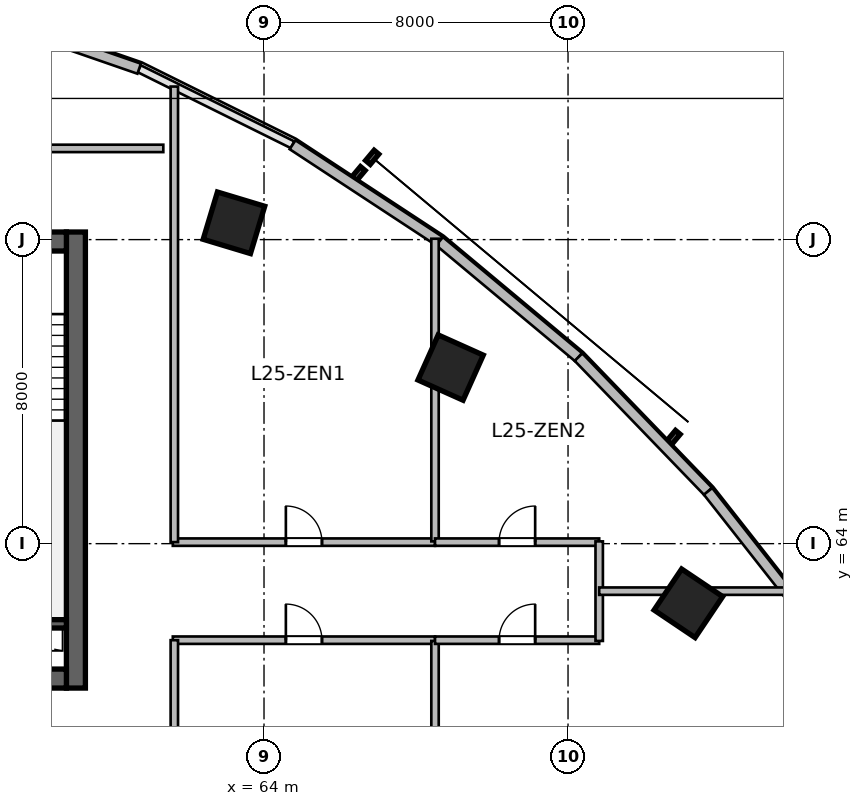
"""IFC4 building model, lengths in metres.
Left out: names, types, materials, properties, quantities, classifications, styles, units other than length and angle.
Written with IfcOpenShell. Run it as: python <this file> out.ifc"""

import sys

from ifc_helpers import new_model, si_unit, direction, frame, frame_2d, origin, origin_2d, place, context, subcontext, project, spatial, rectangle, extrude, source, transform, mapped, element, fill, save


model = new_model("IFC4")
c1 = context("Model", 3, precision=1e-05, world=origin(), true_north=direction((0.0, 1.0)))
c2 = subcontext(c1, "Body", "Model", "MODEL_VIEW")
j1 = project(units=[si_unit("LENGTHUNIT", "METRE"), si_unit("PLANEANGLEUNIT", "RADIAN")], contexts=[c1])
p1 = place(None, origin())
s1 = spatial("IfcSite", under=j1, at=p1, CompositionType="ELEMENT")
p2 = place(p1, origin())
s2 = spatial("IfcBuilding", under=s1, at=p2, CompositionType="ELEMENT")
p3 = place(p2, frame((0.0, 0.0, 107.7)))
s3 = spatial("IfcBuildingStorey", under=s2, at=p3, CompositionType="ELEMENT", Elevation=107.7)
m1 = source(origin(), c2, "Body", "SweptSolid", [
    extrude(rectangle(XDim=12.0, YDim=0.5, at=frame_2d((6.0, 0.0))), origin(), (0.0, 0.0, 1.0), 3.9),
])
p4 = place(p3, frame((59.05, 60.2, 0.0), z_axis=(0.0, 0.0, 1.0), x_axis=(0.0, 1.0, 0.0)))
e1 = element("IfcWall", 1, at=p4, inside=s3, PredefinedType="SHEAR", context=c2, shape_type="MappedRepresentation", body=[
    mapped(m1, transform((0.0, 0.0, 0.0), scale=1.0)),
])
m2 = source(origin(), c2, "Body", "SweptSolid", [
    extrude(rectangle(XDim=21.6, YDim=0.5, at=frame_2d((10.8, 0.0))), origin(), (0.0, 0.0, 1.0), 3.9),
])
p5 = place(p3, frame((37.2, 60.45, 0.0), z_axis=(0.0, 0.0, 1.0), x_axis=(1.0, 0.0, 0.0)))
e2 = element("IfcWall", 2, at=p5, inside=s3, PredefinedType="SHEAR", context=c2, shape_type="MappedRepresentation", body=[
    mapped(m2, transform((0.0, 0.0, 0.0), scale=1.0)),
])
p6 = place(p5, frame((1.1, 0.0, 0.0)))
e3 = element("IfcOpeningElement", 3, at=p6, cuts=e2, PredefinedType="OPENING", context=c2, shape_type="SweptSolid", body=[
    extrude(rectangle(XDim=1.15, YDim=2.15, at=frame_2d((0.575, 1.075))), frame((0.0, 0.26, 0.0), z_axis=(0.0, -1.0, 0.0), x_axis=(1.0, 0.0, 0.0)), (0.0, 0.0, 1.0), 0.52),
])
p7 = place(p5, frame((19.5, 0.0, 0.0)))
e4 = element("IfcOpeningElement", 4, at=p7, cuts=e2, PredefinedType="OPENING", context=c2, shape_type="SweptSolid", body=[
    extrude(rectangle(XDim=0.9, YDim=2.1, at=frame_2d((0.45, 1.05))), frame((0.0, 0.26, 0.0), z_axis=(0.0, -1.0, 0.0), x_axis=(1.0, 0.0, 0.0)), (0.0, 0.0, 1.0), 0.52),
])
p8 = place(p5, frame((12.02, 0.0, 0.0)))
e5 = element("IfcOpeningElement", 5, at=p8, cuts=e2, PredefinedType="OPENING", context=c2, shape_type="SweptSolid", body=[
    extrude(rectangle(XDim=1.6, YDim=2.15, at=frame_2d((0.8, 1.075))), frame((0.0, 0.26, 0.0), z_axis=(0.0, -1.0, 0.0), x_axis=(1.0, 0.0, 0.0)), (0.0, 0.0, 1.0), 0.52),
])
p9 = place(p3, frame((37.2, 71.95, 0.0), z_axis=(0.0, 0.0, 1.0), x_axis=(1.0, 0.0, 0.0)))
e6 = element("IfcWall", 6, at=p9, inside=s3, PredefinedType="SHEAR", context=c2, shape_type="MappedRepresentation", body=[
    mapped(m2, transform((0.0, 0.0, 0.0), scale=1.0)),
])
p10 = place(p9, frame((1.2, 0.0, 0.0)))
e7 = element("IfcOpeningElement", 7, at=p10, cuts=e6, PredefinedType="OPENING", context=c2, shape_type="SweptSolid", body=[
    extrude(rectangle(XDim=0.9, YDim=2.1, at=frame_2d((0.45, 1.05))), frame((0.0, 0.26, 0.0), z_axis=(0.0, -1.0, 0.0), x_axis=(1.0, 0.0, 0.0)), (0.0, 0.0, 1.0), 0.52),
])
p11 = place(p9, frame((14.7, 0.0, 0.0)))
e8 = element("IfcOpeningElement", 8, at=p11, cuts=e6, PredefinedType="OPENING", context=c2, shape_type="SweptSolid", body=[
    extrude(rectangle(XDim=1.2, YDim=2.15, at=frame_2d((0.6, 1.075))), frame((0.0, 0.26, 0.0), z_axis=(0.0, -1.0, 0.0), x_axis=(1.0, 0.0, 0.0)), (0.0, 0.0, 1.0), 0.52),
])
p12 = place(p9, frame((4.15, 0.0, 0.0)))
e9 = element("IfcOpeningElement", 9, at=p12, cuts=e6, PredefinedType="OPENING", context=c2, shape_type="SweptSolid", body=[
    extrude(rectangle(XDim=1.3, YDim=2.15, at=frame_2d((0.65, 1.075))), frame((0.0, 0.26, 0.0), z_axis=(0.0, -1.0, 0.0), x_axis=(1.0, 0.0, 0.0)), (0.0, 0.0, 1.0), 0.52),
])
p13 = place(p9, frame((7.25, 0.0, 0.0)))
e10 = element("IfcOpeningElement", 10, at=p13, cuts=e6, PredefinedType="OPENING", context=c2, shape_type="SweptSolid", body=[
    extrude(rectangle(XDim=0.9, YDim=2.1, at=frame_2d((0.45, 1.05))), frame((0.0, 0.26, 0.0), z_axis=(0.0, -1.0, 0.0), x_axis=(1.0, 0.0, 0.0)), (0.0, 0.0, 1.0), 0.52),
])
p14 = place(p9, frame((10.95, 0.0, 0.0)))
e11 = element("IfcOpeningElement", 11, at=p14, cuts=e6, PredefinedType="OPENING", context=c2, shape_type="SweptSolid", body=[
    extrude(rectangle(XDim=0.9, YDim=2.1, at=frame_2d((0.45, 1.05))), frame((0.0, 0.26, 0.0), z_axis=(0.0, -1.0, 0.0), x_axis=(1.0, 0.0, 0.0)), (0.0, 0.0, 1.0), 0.52),
])
m3 = source(origin(), c2, "Body", "SweptSolid", [
    extrude(rectangle(XDim=3.27, YDim=0.22, at=frame_2d((1.635, 0.0))), origin(), (0.0, 0.0, 1.0), 3.9),
])
p15 = place(p3, frame((55.53, 61.89, 0.0), z_axis=(0.0, 0.0, 1.0), x_axis=(1.0, 0.0, 0.0)))
e12 = element("IfcWall", 12, at=p15, inside=s3, PredefinedType="SHEAR", context=c2, shape_type="MappedRepresentation", body=[
    mapped(m3, transform((0.0, 0.0, 0.0), scale=1.0)),
])
m4 = source(origin(), c2, "Body", "SweptSolid", [
    extrude(rectangle(XDim=1.3, YDim=1.3, at=origin_2d()), origin(), (0.0, 0.0, 1.0), 3.9),
])
for number, where, z_axis, x_axis in (
    (13, (63.209, 72.442, 0.0), (0.0, 0.0, 1.0), (0.289, 0.957, 0.0)),
    (14, (68.91, 68.633, 0.0), (0.0, 0.0, 1.0), (0.409, 0.912, 0.0)),
    (15, (75.167, 62.43, 0.0), (0.0, 0.0, 1.0), (0.558, 0.83, 0.0)),
):
    element("IfcColumn", number, at=place(p3, frame(where, z_axis=z_axis, x_axis=x_axis)), inside=s3, PredefinedType="COLUMN", context=c2, shape_type="MappedRepresentation", body=[
        mapped(m4, transform((0.0, 0.0, 0.0), scale=1.0)),
    ])
m5 = source(origin(), c2, "Body", "SweptSolid", [
    extrude(rectangle(XDim=4.409, YDim=0.28, at=frame_2d((2.205, 0.0))), origin(), (0.0, 0.0, 1.0), 3.65),
])
p16 = place(p3, frame((56.548, 77.941, 0.0), z_axis=(0.0, 0.0, 1.0), x_axis=(0.944879374121, -0.327418643881, 0.0)))
e16 = element("IfcWall", 16, at=p16, inside=s3, PredefinedType="SOLIDWALL", context=c2, shape_type="MappedRepresentation", body=[
    mapped(m5, transform((0.0, 0.0, 0.0), scale=1.0)),
])
m6 = source(origin(), c2, "Body", "SweptSolid", [
    extrude(rectangle(XDim=4.626, YDim=0.28, at=frame_2d((2.313, 0.0))), origin(), (0.0, 0.0, 1.0), 3.65),
])
p17 = place(p3, frame((64.751, 74.496, 0.0), z_axis=(0.0, 0.0, 1.0), x_axis=(0.83595938331, -0.548791316855, 0.0)))
e17 = element("IfcWall", 17, at=p17, inside=s3, PredefinedType="SOLIDWALL", context=c2, shape_type="MappedRepresentation", body=[
    mapped(m6, transform((0.0, 0.0, 0.0), scale=1.0)),
])
m7 = source(origin(), c2, "Body", "SweptSolid", [
    extrude(rectangle(XDim=4.762, YDim=0.28, at=frame_2d((2.381, 0.0))), origin(), (0.0, 0.0, 1.0), 3.65),
])
p18 = place(p3, frame((68.618, 71.958, 0.0), z_axis=(0.0, 0.0, 1.0), x_axis=(0.767952279762, -0.640507061638, 0.0)))
e18 = element("IfcWall", 18, at=p18, inside=s3, PredefinedType="SOLIDWALL", context=c2, shape_type="MappedRepresentation", body=[
    mapped(m7, transform((0.0, 0.0, 0.0), scale=1.0)),
])
m8 = source(origin(), c2, "Body", "SweptSolid", [
    extrude(rectangle(XDim=4.908, YDim=0.28, at=frame_2d((2.454, 0.0))), origin(), (0.0, 0.0, 1.0), 3.65),
])
p19 = place(p3, frame((72.275, 68.907, 0.0), z_axis=(0.0, 0.0, 1.0), x_axis=(0.694613154328, -0.719383462302, 0.0)))
e19 = element("IfcWall", 19, at=p19, inside=s3, PredefinedType="SOLIDWALL", context=c2, shape_type="MappedRepresentation", body=[
    mapped(m8, transform((0.0, 0.0, 0.0), scale=1.0)),
])
m9 = source(origin(), c2, "Body", "SweptSolid", [
    extrude(rectangle(XDim=5.058, YDim=0.28, at=frame_2d((2.529, 0.0))), origin(), (0.0, 0.0, 1.0), 3.65),
])
p20 = place(p3, frame((75.685, 65.376, 0.0), z_axis=(0.0, 0.0, 1.0), x_axis=(0.618145507434, -0.786063694391, 0.0)))
e20 = element("IfcWall", 20, at=p20, inside=s3, PredefinedType="SOLIDWALL", context=c2, shape_type="MappedRepresentation", body=[
    mapped(m9, transform((0.0, 0.0, 0.0), scale=1.0)),
])
m10 = source(origin(), c2, "Body", "SweptSolid", [
    extrude(rectangle(XDim=13.2, YDim=0.195, at=frame_2d((6.6, 0.0))), origin(), (0.0, 0.0, 1.0), 3.022),
])
p21 = place(p3, frame((48.15, 74.4, 0.0), z_axis=(0.0, 0.0, 1.0), x_axis=(1.0, 0.0, 0.0)))
e21 = element("IfcWall", 21, at=p21, inside=s3, PredefinedType="PARTITIONING", context=c2, shape_type="MappedRepresentation", body=[
    mapped(m10, transform((0.0, 0.0, 0.0), scale=1.0)),
])
p22 = place(p21, frame((5.6, 0.0, 0.0)))
e22 = element("IfcOpeningElement", 22, at=p22, cuts=e21, PredefinedType="OPENING", context=c2, shape_type="SweptSolid", body=[
    extrude(rectangle(XDim=1.1, YDim=2.15, at=frame_2d((0.55, 1.075))), frame((0.0, 0.107, 0.0), z_axis=(0.0, -1.0, 0.0), x_axis=(1.0, 0.0, 0.0)), (0.0, 0.0, 1.0), 0.215),
])
m11 = source(origin(), c2, "Body", "SweptSolid", [
    extrude(rectangle(XDim=6.9, YDim=0.195, at=frame_2d((3.45, 0.0))), origin(), (0.0, 0.0, 1.0), 3.65),
])
p23 = place(p3, frame((61.6, 64.04, 0.0), z_axis=(0.0, 0.0, 1.0), x_axis=(1.0, 0.0, 0.0)))
e23 = element("IfcWall", 23, at=p23, inside=s3, PredefinedType="PARTITIONING", context=c2, shape_type="MappedRepresentation", body=[
    mapped(m11, transform((0.0, 0.0, 0.0), scale=1.0)),
])
p24 = place(p23, frame((2.975, 0.0, 0.0)))
e24 = element("IfcOpeningElement", 24, at=p24, cuts=e23, PredefinedType="OPENING", context=c2, shape_type="SweptSolid", body=[
    extrude(rectangle(XDim=0.95, YDim=2.1, at=frame_2d((0.475, 1.05))), frame((0.0, 0.107, 0.0), z_axis=(0.0, -1.0, 0.0), x_axis=(1.0, 0.0, 0.0)), (0.0, 0.0, 1.0), 0.215),
])
m12 = source(origin(), c2, "Body", "SweptSolid", [
    extrude(rectangle(XDim=7.963, YDim=0.195, at=frame_2d((3.982, 0.0))), origin(), (0.0, 0.0, 1.0), 2.942),
])
p25 = place(p3, frame((68.5, 64.06, 0.0), z_axis=(0.0, 0.0, 1.0), x_axis=(0.0, 1.0, 0.0)))
e25 = element("IfcWall", 25, at=p25, inside=s3, PredefinedType="PARTITIONING", context=c2, shape_type="MappedRepresentation", body=[
    mapped(m12, transform((0.0, 0.0, 0.0), scale=1.0)),
])
m13 = source(origin(), c2, "Body", "SweptSolid", [
    extrude(rectangle(XDim=4.32, YDim=0.195, at=frame_2d((2.16, 0.0))), origin(), (0.0, 0.0, 1.0), 3.65),
])
p26 = place(p3, frame((68.5, 64.04, 0.0), z_axis=(0.0, 0.0, 1.0), x_axis=(1.0, 0.0, 0.0)))
e26 = element("IfcWall", 26, at=p26, inside=s3, PredefinedType="PARTITIONING", context=c2, shape_type="MappedRepresentation", body=[
    mapped(m13, transform((0.0, 0.0, 0.0), scale=1.0)),
])
p27 = place(p26, frame((1.685, 0.0, 0.0)))
e27 = element("IfcOpeningElement", 27, at=p27, cuts=e26, PredefinedType="OPENING", context=c2, shape_type="SweptSolid", body=[
    extrude(rectangle(XDim=0.95, YDim=2.1, at=frame_2d((0.475, 1.05))), frame((0.0, 0.107, 0.0), z_axis=(0.0, -1.0, 0.0), x_axis=(1.0, 0.0, 0.0)), (0.0, 0.0, 1.0), 0.215),
])
p28 = place(p3, frame((61.6, 61.46, 0.0), z_axis=(0.0, 0.0, 1.0), x_axis=(1.0, 0.0, 0.0)))
e28 = element("IfcWall", 28, at=p28, inside=s3, PredefinedType="PARTITIONING", context=c2, shape_type="MappedRepresentation", body=[
    mapped(m11, transform((0.0, 0.0, 0.0), scale=1.0)),
])
p29 = place(p28, frame((2.975, 0.0, 0.0)))
e29 = element("IfcOpeningElement", 29, at=p29, cuts=e28, PredefinedType="OPENING", context=c2, shape_type="SweptSolid", body=[
    extrude(rectangle(XDim=0.95, YDim=2.1, at=frame_2d((0.475, 1.05))), frame((0.0, 0.107, 0.0), z_axis=(0.0, -1.0, 0.0), x_axis=(1.0, 0.0, 0.0)), (0.0, 0.0, 1.0), 0.215),
])
m14 = source(origin(), c2, "Body", "SweptSolid", [
    extrude(rectangle(XDim=23.346, YDim=0.195, at=frame_2d((11.673, 0.0))), origin(), (0.0, 0.0, 1.0), 2.942),
])
p30 = place(p3, frame((68.5, 38.094, 0.0), z_axis=(0.0, 0.0, 1.0), x_axis=(0.0, 1.0, 0.0)))
e30 = element("IfcWall", 30, at=p30, inside=s3, PredefinedType="PARTITIONING", context=c2, shape_type="MappedRepresentation", body=[
    mapped(m14, transform((0.0, 0.0, 0.0), scale=1.0)),
])
p31 = place(p3, frame((68.5, 61.46, 0.0), z_axis=(0.0, 0.0, 1.0), x_axis=(1.0, 0.0, 0.0)))
e31 = element("IfcWall", 31, at=p31, inside=s3, PredefinedType="PARTITIONING", context=c2, shape_type="MappedRepresentation", body=[
    mapped(m13, transform((0.0, 0.0, 0.0), scale=1.0)),
])
p32 = place(p31, frame((1.685, 0.0, 0.0)))
e32 = element("IfcOpeningElement", 32, at=p32, cuts=e31, PredefinedType="OPENING", context=c2, shape_type="SweptSolid", body=[
    extrude(rectangle(XDim=0.95, YDim=2.1, at=frame_2d((0.475, 1.05))), frame((0.0, 0.107, 0.0), z_axis=(0.0, -1.0, 0.0), x_axis=(1.0, 0.0, 0.0)), (0.0, 0.0, 1.0), 0.215),
])
m15 = source(origin(), c2, "Body", "SweptSolid", [
    extrude(rectangle(XDim=13.988, YDim=0.195, at=frame_2d((6.994, 0.0))), origin(), (0.0, 0.0, 1.0), 2.942),
])
p33 = place(p3, frame((61.64, 47.472, 0.0), z_axis=(0.0, 0.0, 1.0), x_axis=(0.0, 1.0, 0.0)))
e33 = element("IfcWall", 33, at=p33, inside=s3, PredefinedType="PARTITIONING", context=c2, shape_type="MappedRepresentation", body=[
    mapped(m15, transform((0.0, 0.0, 0.0), scale=1.0)),
])
m16 = source(origin(), c2, "Body", "SweptSolid", [
    extrude(rectangle(XDim=11.987, YDim=0.195, at=frame_2d((5.994, 0.0))), origin(), (0.0, 0.0, 1.0), 3.65),
])
p34 = place(p3, frame((61.64, 64.04, 0.0), z_axis=(0.0, 0.0, 1.0), x_axis=(0.0, 1.0, 0.0)))
e34 = element("IfcWall", 34, at=p34, inside=s3, PredefinedType="PARTITIONING", context=c2, shape_type="MappedRepresentation", body=[
    mapped(m16, transform((0.0, 0.0, 0.0), scale=1.0)),
])
m17 = source(origin(), c2, "Body", "SweptSolid", [
    extrude(rectangle(XDim=2.62, YDim=0.195, at=frame_2d((1.31, 0.0))), origin(), (0.0, 0.0, 1.0), 3.324),
])
p35 = place(p3, frame((72.82, 61.44, 0.0), z_axis=(0.0, 0.0, 1.0), x_axis=(0.0, 1.0, 0.0)))
e35 = element("IfcWall", 35, at=p35, inside=s3, PredefinedType="PARTITIONING", context=c2, shape_type="MappedRepresentation", body=[
    mapped(m17, transform((0.0, 0.0, 0.0), scale=1.0)),
])
m18 = source(origin(), c2, "Body", "SweptSolid", [
    extrude(rectangle(XDim=4.917, YDim=0.195, at=frame_2d((2.459, 0.0))), origin(), (0.0, 0.0, 1.0), 3.65),
])
p36 = place(p3, frame((72.82, 62.75, 0.0), z_axis=(0.0, 0.0, 1.0), x_axis=(1.0, 0.0, 0.0)))
e36 = element("IfcWall", 36, at=p36, inside=s3, PredefinedType="PARTITIONING", context=c2, shape_type="MappedRepresentation", body=[
    mapped(m18, transform((0.0, 0.0, 0.0), scale=1.0)),
])
m19 = source(origin(), c2, "Body", "SweptSolid", [
    extrude(rectangle(XDim=0.95, YDim=2.1, at=frame_2d((0.475, 1.05))), frame((0.0, 0.025, 0.0), z_axis=(0.0, -1.0, 0.0), x_axis=(1.0, 0.0, 0.0)), (0.0, 0.0, 1.0), 0.05),
])
p37 = place(p24, origin())
e37 = element("IfcDoor", 37, at=p37, inside=s3, OperationType="SINGLE_SWING_LEFT", PredefinedType="DOOR", context=c2, shape_type="MappedRepresentation", body=[
    mapped(m19, transform((0.0, 0.0, 0.0), scale=1.0)),
])
fill(e24, e37)
p38 = place(p27, origin())
e38 = element("IfcDoor", 38, at=p38, inside=s3, OperationType="SINGLE_SWING_RIGHT", PredefinedType="DOOR", context=c2, shape_type="MappedRepresentation", body=[
    mapped(m19, transform((0.0, 0.0, 0.0), scale=1.0)),
])
fill(e27, e38)
p39 = place(p29, origin())
e39 = element("IfcDoor", 39, at=p39, inside=s3, OperationType="SINGLE_SWING_LEFT", PredefinedType="DOOR", context=c2, shape_type="MappedRepresentation", body=[
    mapped(m19, transform((0.0, 0.0, 0.0), scale=1.0)),
])
fill(e29, e39)
p40 = place(p32, origin())
e40 = element("IfcDoor", 40, at=p40, inside=s3, OperationType="SINGLE_SWING_RIGHT", PredefinedType="DOOR", context=c2, shape_type="MappedRepresentation", body=[
    mapped(m19, transform((0.0, 0.0, 0.0), scale=1.0)),
])
fill(e32, e40)
save(model, sys.argv[1])
